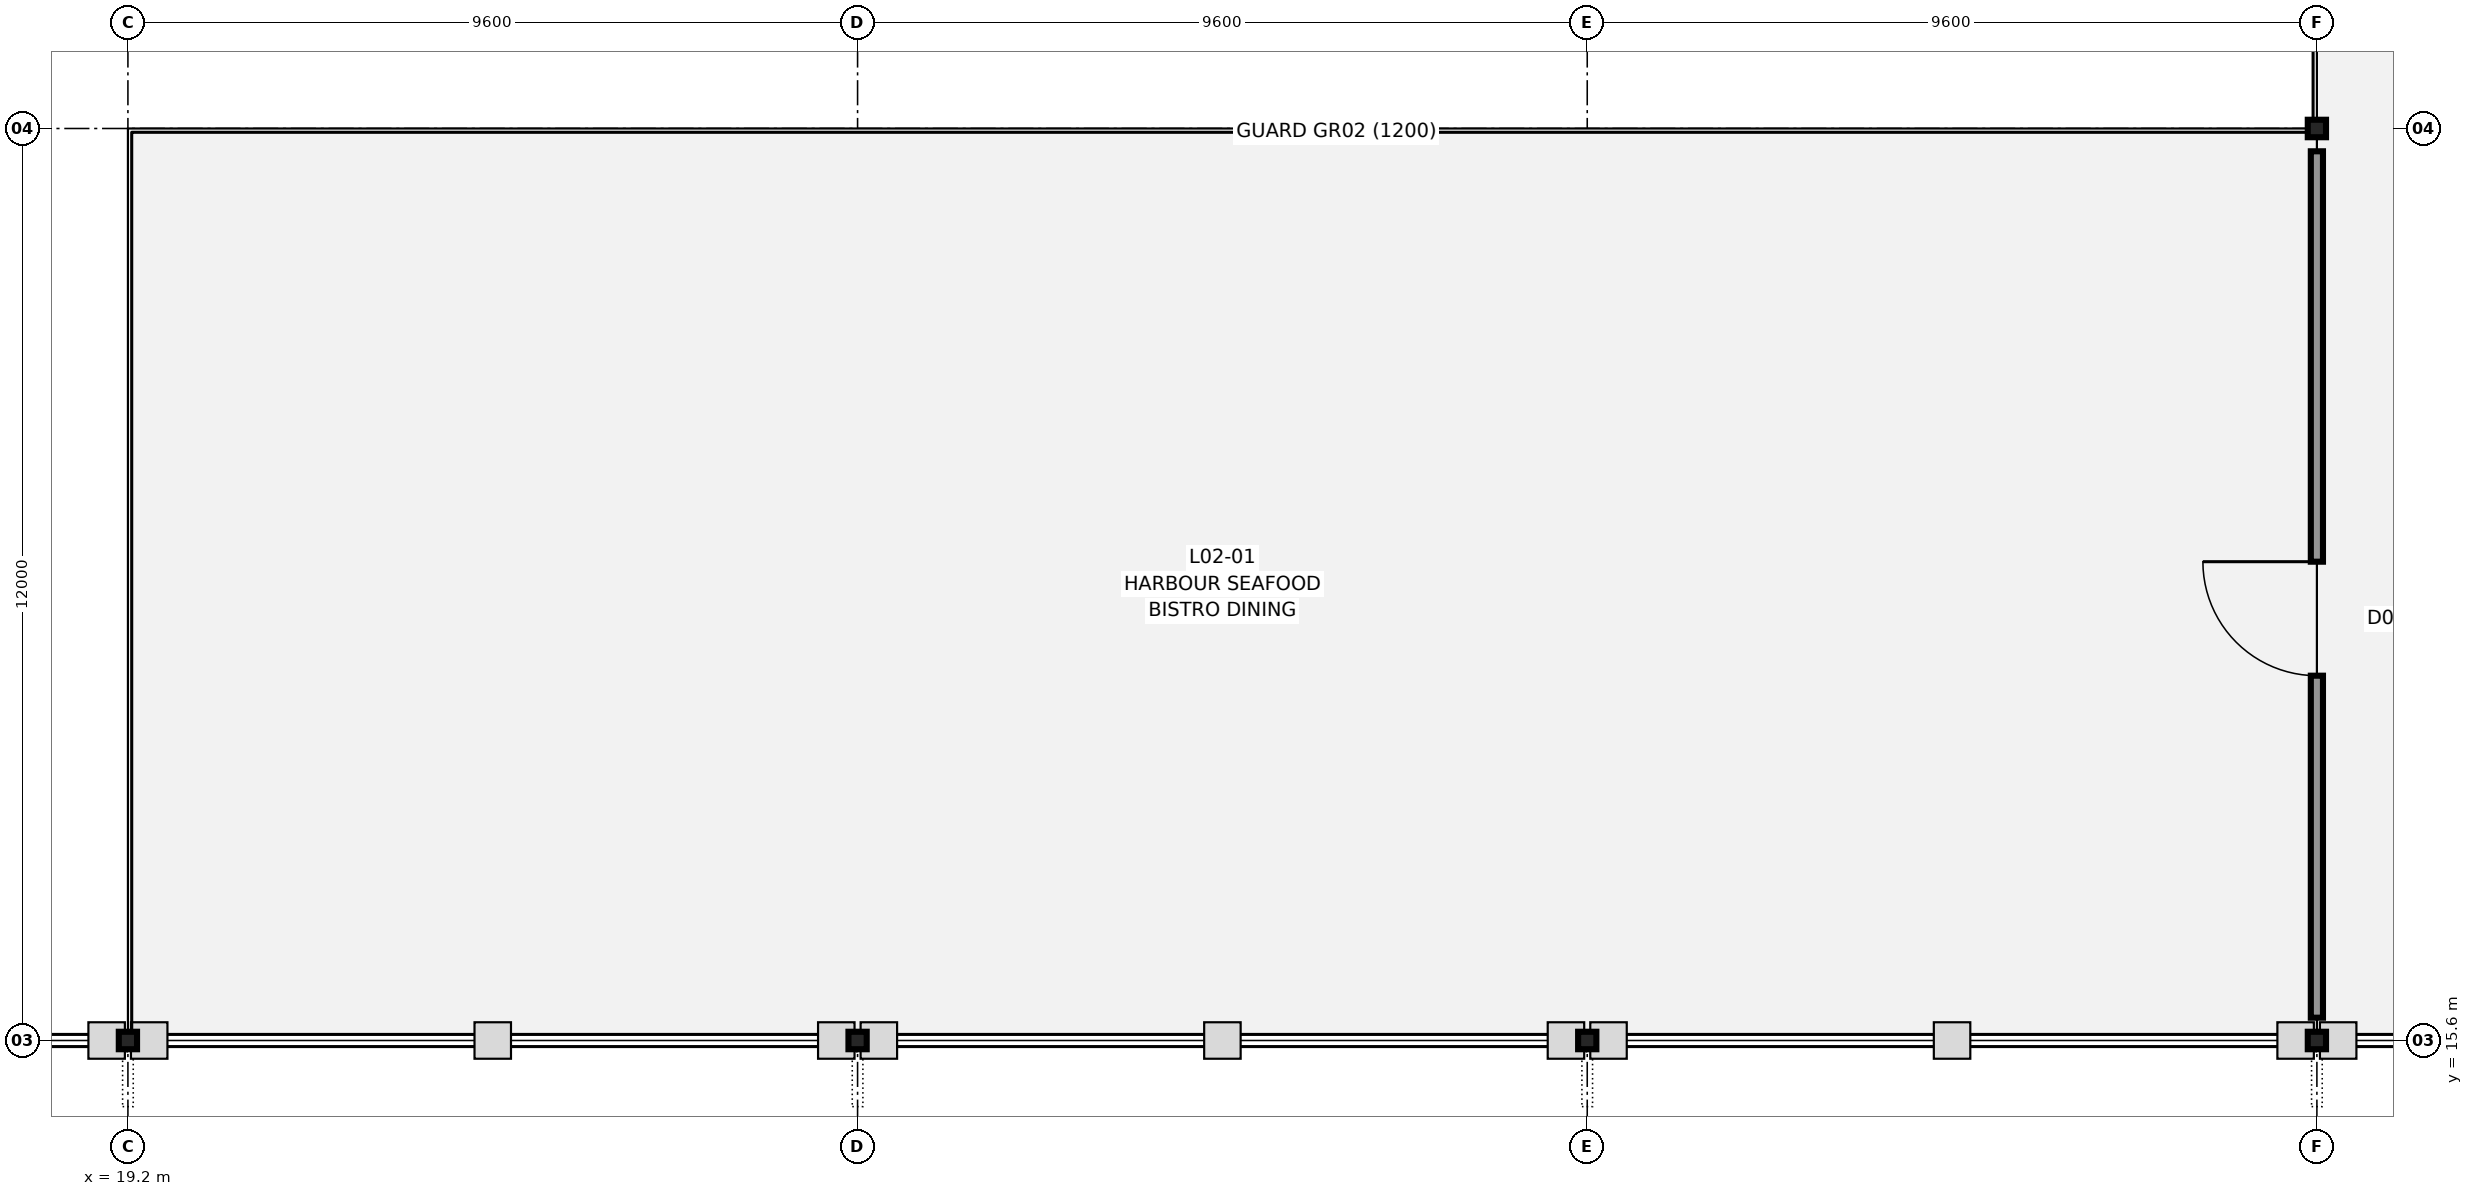
"""IFC4 building model, lengths in metres.
Left out: names, types, materials, properties, quantities, classifications, styles, units other than length and angle.
Written with IfcOpenShell. Run it as: python <this file> out.ifc"""

import sys

from ifc_helpers import new_model, si_unit, direction, frame, frame_2d, origin, origin_2d, place, context, subcontext, project, spatial, rectangle, i_section, extrude, element, fill, save


model = new_model("IFC4")
c1 = context("Model", 3, precision=1e-05, world=origin(), true_north=direction((0.0, 1.0)))
c2 = subcontext(c1, "Body", "Model", "MODEL_VIEW")
j1 = project(units=[si_unit("LENGTHUNIT", "METRE"), si_unit("PLANEANGLEUNIT", "RADIAN")], contexts=[c1])
p1 = place(None, origin())
s1 = spatial("IfcSite", under=j1, at=p1, CompositionType="ELEMENT")
p2 = place(p1, origin())
s2 = spatial("IfcBuilding", under=s1, at=p2, CompositionType="ELEMENT")
p3 = place(p2, frame((0.0, 0.0, 10.2)))
s3 = spatial("IfcBuildingStorey", under=s2, at=p3, CompositionType="ELEMENT", Elevation=10.2)
for number, where, z_axis, x_axis in (
    (1, (19.2, 15.6, 0.0), (0.0, 0.0, 1.0), (1.0, 0.0, 0.0)),
    (2, (28.8, 15.6, 0.0), (0.0, 0.0, 1.0), (1.0, 0.0, 0.0)),
    (3, (38.4, 15.6, 0.0), (0.0, 0.0, 1.0), (1.0, 0.0, 0.0)),
    (4, (48.0, 15.6, 0.0), (0.0, 0.0, 1.0), (1.0, 0.0, 0.0)),
    (5, (48.0, 27.6, 0.0), (0.0, 0.0, 1.0), (1.0, 0.0, 0.0)),
):
    element("IfcColumn", number, at=place(p3, frame(where, z_axis=z_axis, x_axis=x_axis)), inside=s3, PredefinedType="COLUMN", context=c2, shape_type="SweptSolid", body=[
        extrude(i_section(OverallWidth=0.24, OverallDepth=0.23, WebThickness=0.008, FlangeThickness=0.012, FilletRadius=0.021, at=origin_2d()), origin(), (0.0, 0.0, 1.0), 3.9),
    ])
p4 = place(p3, frame((48.0, 15.9, 0.0), z_axis=(0.0, 0.0, 1.0), x_axis=(0.0, 1.0, 0.0)))
e6 = element("IfcWall", 6, at=p4, inside=s3, PredefinedType="PARTITIONING", context=c2, shape_type="SweptSolid", body=[
    extrude(rectangle(XDim=11.4, YDim=0.16, at=frame_2d((5.7, 0.0))), origin(), (0.0, 0.0, 1.0), 3.58),
])
p5 = place(p4, frame((4.5, 0.0, 0.0)))
e7 = element("IfcOpeningElement", 7, at=p5, cuts=e6, PredefinedType="OPENING", context=c2, shape_type="SweptSolid", body=[
    extrude(rectangle(XDim=1.5, YDim=2.15, at=frame_2d((0.75, 1.075))), frame((0.0, 0.09, 0.0), z_axis=(0.0, -1.0, 0.0), x_axis=(1.0, 0.0, 0.0)), (0.0, 0.0, 1.0), 0.18),
])
p6 = place(p5, origin())
e8 = element("IfcDoor", 8, at=p6, inside=s3, OperationType="SINGLE_SWING_RIGHT", PredefinedType="DOOR", context=c2, shape_type="SweptSolid", body=[
    extrude(rectangle(XDim=1.5, YDim=2.15, at=frame_2d((0.75, 1.075))), frame((0.0, 0.025, 0.0), z_axis=(0.0, -1.0, 0.0), x_axis=(1.0, 0.0, 0.0)), (0.0, 0.0, 1.0), 0.05),
])
fill(e7, e8)
save(model, sys.argv[1])
